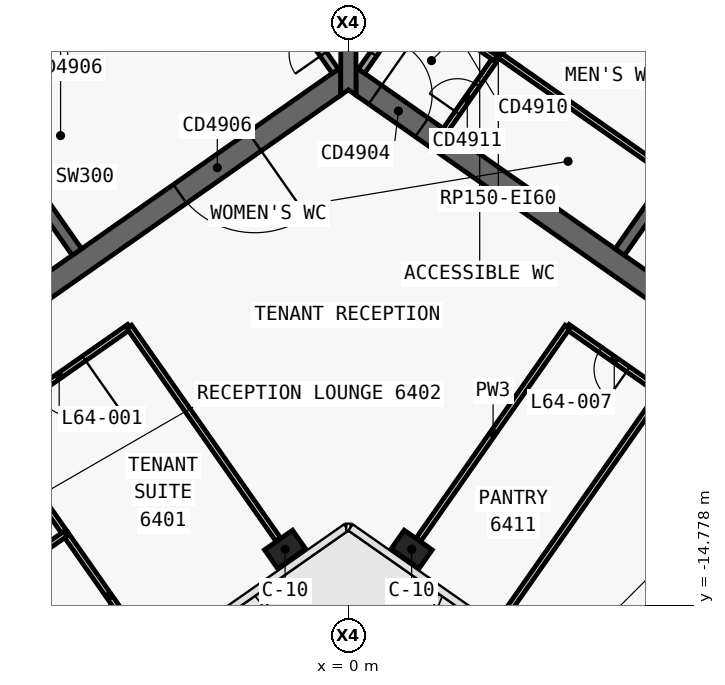
"""IFC4 building model, lengths in metres.
Left out: names, types, materials, properties, quantities, classifications, styles, units other than length and angle.
Written with IfcOpenShell. Run it as: python <this file> out.ifc"""

import sys

from ifc_helpers import new_model, si_unit, direction, frame, frame_2d, origin, origin_2d, place, context, subcontext, project, spatial, polyline, rectangle, outline, extrude, element, fill, save


model = new_model("IFC4")
c1 = context("Model", 3, precision=1e-05, world=origin(), true_north=direction((0.0, 1.0)))
c2 = subcontext(c1, "Body", "Model", "MODEL_VIEW")
j1 = project(units=[si_unit("LENGTHUNIT", "METRE"), si_unit("PLANEANGLEUNIT", "RADIAN")], contexts=[c1])
p1 = place(None, origin())
s1 = spatial("IfcSite", under=j1, at=p1, CompositionType="ELEMENT")
p2 = place(p1, origin())
s2 = spatial("IfcBuilding", under=s1, at=p2, CompositionType="ELEMENT")
p3 = place(p2, frame((0.0, 0.0, 272.2)))
s3 = spatial("IfcBuildingStorey", under=s2, at=p3, CompositionType="ELEMENT", Elevation=272.2)
p4 = place(p3, frame((-0.028, 12.066, 0.0), z_axis=(0.0, 0.0, 1.0), x_axis=(-0.819151382952, -0.573577380837, 0.0)))
e1 = element("IfcWall", 1, at=p4, inside=s3, PredefinedType="SHEAR", context=c2, shape_type="SweptSolid", body=[
    extrude(outline(polyline([(33.898, 0.3), (0.42, 0.3), (0.0, -0.3), (33.898, -0.3), (33.898, 0.3)])), origin(), (0.0, 0.0, 1.0), 3.9),
])
p5 = place(p3, frame((-0.028, -0.874, 0.0), z_axis=(0.0, 0.0, 1.0), x_axis=(-0.819150035022, -0.573579305871, 0.0)))
e2 = element("IfcWall", 2, at=p5, inside=s3, PredefinedType="SHEAR", context=c2, shape_type="SweptSolid", body=[
    extrude(outline(polyline([(26.476, 0.3), (0.42, 0.3), (0.0, -0.3), (26.476, -0.3), (26.476, 0.3)])), origin(), (0.0, 0.0, 1.0), 3.9),
])
p6 = place(p5, frame((2.976, 0.0, 0.0)))
e3 = element("IfcOpeningElement", 3, at=p6, cuts=e2, PredefinedType="OPENING", context=c2, shape_type="SweptSolid", body=[
    extrude(rectangle(XDim=2.4, YDim=2.1, at=frame_2d((1.2, 1.05))), frame((0.0, 0.31, 0.0), z_axis=(0.0, -1.0, 0.0), x_axis=(1.0, 0.0, 0.0)), (0.0, 0.0, 1.0), 0.62),
])
p7 = place(p5, frame((11.776, 0.0, 0.0)))
e4 = element("IfcOpeningElement", 4, at=p7, cuts=e2, PredefinedType="OPENING", context=c2, shape_type="SweptSolid", body=[
    extrude(rectangle(XDim=2.4, YDim=2.1, at=frame_2d((1.2, 1.05))), frame((0.0, 0.31, 0.0), z_axis=(0.0, -1.0, 0.0), x_axis=(1.0, 0.0, 0.0)), (0.0, 0.0, 1.0), 0.62),
])
p8 = place(p3, frame((-7.143, -5.49, 0.0), z_axis=(0.0, 0.0, 1.0), x_axis=(-0.573617744349, 0.819123118565, 0.0)))
e5 = element("IfcWall", 5, at=p8, inside=s3, PredefinedType="SHEAR", context=c2, shape_type="SweptSolid", body=[
    extrude(outline(polyline([(4.85, 0.15), (0.0, 0.15), (0.0, -0.15), (4.85, -0.15), (4.85, 0.15)])), origin(), (0.0, 0.0, 1.0), 3.9),
])
p9 = place(p3, frame((-2.638, 3.768, 0.0), z_axis=(0.0, 0.0, 1.0), x_axis=(-0.819155014212, -0.573572194837, 0.0)))
e6 = element("IfcWall", 6, at=p9, inside=s3, PredefinedType="SHEAR", context=c2, shape_type="SweptSolid", body=[
    extrude(outline(polyline([(26.4, 0.15), (0.0, 0.15), (0.0, -0.15), (26.4, -0.15), (26.4, 0.15)])), origin(), (0.0, 0.0, 1.0), 3.9),
])
p10 = place(p9, frame((1.169, 0.0, 0.0)))
e7 = element("IfcOpeningElement", 7, at=p10, cuts=e6, PredefinedType="OPENING", context=c2, shape_type="SweptSolid", body=[
    extrude(rectangle(XDim=1.1, YDim=2.1, at=frame_2d((0.55, 1.05))), frame((0.0, 0.16, 0.0), z_axis=(0.0, -1.0, 0.0), x_axis=(1.0, 0.0, 0.0)), (0.0, 0.0, 1.0), 0.32),
])
p11 = place(p9, frame((3.206, 0.0, 0.0)))
e8 = element("IfcOpeningElement", 8, at=p11, cuts=e6, PredefinedType="OPENING", context=c2, shape_type="SweptSolid", body=[
    extrude(rectangle(XDim=1.1, YDim=2.1, at=frame_2d((0.55, 1.05))), frame((0.0, 0.16, 0.0), z_axis=(0.0, -1.0, 0.0), x_axis=(1.0, 0.0, 0.0)), (0.0, 0.0, 1.0), 0.32),
])
p12 = place(p9, frame((5.244, 0.0, 0.0)))
e9 = element("IfcOpeningElement", 9, at=p12, cuts=e6, PredefinedType="OPENING", context=c2, shape_type="SweptSolid", body=[
    extrude(rectangle(XDim=1.1, YDim=2.1, at=frame_2d((0.55, 1.05))), frame((0.0, 0.16, 0.0), z_axis=(0.0, -1.0, 0.0), x_axis=(1.0, 0.0, 0.0)), (0.0, 0.0, 1.0), 0.32),
])
p13 = place(p9, frame((7.281, 0.0, 0.0)))
e10 = element("IfcOpeningElement", 10, at=p13, cuts=e6, PredefinedType="OPENING", context=c2, shape_type="SweptSolid", body=[
    extrude(rectangle(XDim=1.1, YDim=2.1, at=frame_2d((0.55, 1.05))), frame((0.0, 0.16, 0.0), z_axis=(0.0, -1.0, 0.0), x_axis=(1.0, 0.0, 0.0)), (0.0, 0.0, 1.0), 0.32),
])
p14 = place(p9, frame((9.688, 0.0, 0.0)))
e11 = element("IfcOpeningElement", 11, at=p14, cuts=e6, PredefinedType="OPENING", context=c2, shape_type="SweptSolid", body=[
    extrude(rectangle(XDim=1.1, YDim=2.1, at=frame_2d((0.55, 1.05))), frame((0.0, 0.16, 0.0), z_axis=(0.0, -1.0, 0.0), x_axis=(1.0, 0.0, 0.0)), (0.0, 0.0, 1.0), 0.32),
])
p15 = place(p9, frame((11.863, 0.0, 0.0)))
e12 = element("IfcOpeningElement", 12, at=p15, cuts=e6, PredefinedType="OPENING", context=c2, shape_type="SweptSolid", body=[
    extrude(rectangle(XDim=1.1, YDim=2.1, at=frame_2d((0.55, 1.05))), frame((0.0, 0.16, 0.0), z_axis=(0.0, -1.0, 0.0), x_axis=(1.0, 0.0, 0.0)), (0.0, 0.0, 1.0), 0.32),
])
p16 = place(p9, frame((15.175, 0.0, 0.0)))
e13 = element("IfcOpeningElement", 13, at=p16, cuts=e6, PredefinedType="OPENING", context=c2, shape_type="SweptSolid", body=[
    extrude(rectangle(XDim=1.0, YDim=2.1, at=frame_2d((0.5, 1.05))), frame((0.0, 0.16, 0.0), z_axis=(0.0, -1.0, 0.0), x_axis=(1.0, 0.0, 0.0)), (0.0, 0.0, 1.0), 0.32),
])
p17 = place(p3, frame((0.028, 12.066, 0.0), z_axis=(0.0, 0.0, 1.0), x_axis=(0.819151382952, -0.573577380837, 0.0)))
e14 = element("IfcWall", 14, at=p17, inside=s3, PredefinedType="SHEAR", context=c2, shape_type="SweptSolid", body=[
    extrude(outline(polyline([(33.898, 0.3), (0.0, 0.3), (0.42, -0.3), (33.898, -0.3), (33.898, 0.3)])), origin(), (0.0, 0.0, 1.0), 3.9),
])
p18 = place(p3, frame((0.028, -0.874, 0.0), z_axis=(0.0, 0.0, 1.0), x_axis=(0.819150035022, -0.573579305871, 0.0)))
e15 = element("IfcWall", 15, at=p18, inside=s3, PredefinedType="SHEAR", context=c2, shape_type="SweptSolid", body=[
    extrude(outline(polyline([(26.476, 0.3), (0.0, 0.3), (0.42, -0.3), (26.476, -0.3), (26.476, 0.3)])), origin(), (0.0, 0.0, 1.0), 3.9),
])
p19 = place(p18, frame((0.826, 0.0, 0.0)))
e16 = element("IfcOpeningElement", 16, at=p19, cuts=e15, PredefinedType="OPENING", context=c2, shape_type="SweptSolid", body=[
    extrude(rectangle(XDim=1.5, YDim=2.1, at=frame_2d((0.75, 1.05))), frame((0.0, 0.31, 0.0), z_axis=(0.0, -1.0, 0.0), x_axis=(1.0, 0.0, 0.0)), (0.0, 0.0, 1.0), 0.62),
])
p20 = place(p18, frame((12.226, 0.0, 0.0)))
e17 = element("IfcOpeningElement", 17, at=p20, cuts=e15, PredefinedType="OPENING", context=c2, shape_type="SweptSolid", body=[
    extrude(rectangle(XDim=1.5, YDim=2.1, at=frame_2d((0.75, 1.05))), frame((0.0, 0.31, 0.0), z_axis=(0.0, -1.0, 0.0), x_axis=(1.0, 0.0, 0.0)), (0.0, 0.0, 1.0), 0.62),
])
p21 = place(p3, frame((7.143, -5.49, 0.0), z_axis=(0.0, 0.0, 1.0), x_axis=(0.573617744349, 0.819123118565, 0.0)))
e18 = element("IfcWall", 18, at=p21, inside=s3, PredefinedType="SHEAR", context=c2, shape_type="SweptSolid", body=[
    extrude(outline(polyline([(0.0, 0.15), (0.0, -0.15), (4.85, -0.15), (4.85, 0.15), (0.0, 0.15)])), origin(), (0.0, 0.0, 1.0), 3.9),
])
p22 = place(p3, frame((2.638, 3.768, 0.0), z_axis=(0.0, 0.0, 1.0), x_axis=(0.819155014212, -0.573572194837, 0.0)))
e19 = element("IfcWall", 19, at=p22, inside=s3, PredefinedType="SHEAR", context=c2, shape_type="SweptSolid", body=[
    extrude(outline(polyline([(0.0, 0.15), (0.0, -0.15), (26.4, -0.15), (26.4, 0.15), (0.0, 0.15)])), origin(), (0.0, 0.0, 1.0), 3.9),
])
p23 = place(p22, frame((9.637, 0.0, 0.0)))
e20 = element("IfcOpeningElement", 20, at=p23, cuts=e19, PredefinedType="OPENING", context=c2, shape_type="SweptSolid", body=[
    extrude(rectangle(XDim=1.2, YDim=2.1, at=frame_2d((0.6, 1.05))), frame((0.0, 0.16, 0.0), z_axis=(0.0, -1.0, 0.0), x_axis=(1.0, 0.0, 0.0)), (0.0, 0.0, 1.0), 0.32),
])
p24 = place(p22, frame((11.812, 0.0, 0.0)))
e21 = element("IfcOpeningElement", 21, at=p24, cuts=e19, PredefinedType="OPENING", context=c2, shape_type="SweptSolid", body=[
    extrude(rectangle(XDim=1.2, YDim=2.1, at=frame_2d((0.6, 1.05))), frame((0.0, 0.16, 0.0), z_axis=(0.0, -1.0, 0.0), x_axis=(1.0, 0.0, 0.0)), (0.0, 0.0, 1.0), 0.32),
])
p25 = place(p22, frame((13.988, 0.0, 0.0)))
e22 = element("IfcOpeningElement", 22, at=p25, cuts=e19, PredefinedType="OPENING", context=c2, shape_type="SweptSolid", body=[
    extrude(rectangle(XDim=1.2, YDim=2.1, at=frame_2d((0.6, 1.05))), frame((0.0, 0.16, 0.0), z_axis=(0.0, -1.0, 0.0), x_axis=(1.0, 0.0, 0.0)), (0.0, 0.0, 1.0), 0.32),
])
p26 = place(p22, frame((16.262, 0.0, 0.0)))
e23 = element("IfcOpeningElement", 23, at=p26, cuts=e19, PredefinedType="OPENING", context=c2, shape_type="SweptSolid", body=[
    extrude(rectangle(XDim=1.0, YDim=2.1, at=frame_2d((0.5, 1.05))), frame((0.0, 0.16, 0.0), z_axis=(0.0, -1.0, 0.0), x_axis=(1.0, 0.0, 0.0)), (0.0, 0.0, 1.0), 0.32),
])
p27 = place(p3, frame((0.0, -1.361, 0.0), z_axis=(0.0, 0.0, 1.0), x_axis=(0.0, 1.0, 0.0)))
e24 = element("IfcWall", 24, at=p27, inside=s3, PredefinedType="SHEAR", context=c2, shape_type="SweptSolid", body=[
    extrude(outline(polyline([(0.14, 0.2), (0.0, 0.2), (0.14, 0.0), (0.0, -0.2), (0.14, -0.2), (1.012, -0.2), (12.94, -0.2), (13.813, -0.2), (13.893, -0.2), (13.933, -0.172), (13.813, 0.0), (13.933, 0.172), (13.893, 0.2), (13.813, 0.2), (12.94, 0.2), (1.012, 0.2), (0.14, 0.2)])), origin(), (0.0, 0.0, 1.0), 3.9),
])
for number, where, z_axis, x_axis in (
    (25, (-1.665, -13.313, 0.0), (0.0, 0.0, 1.0), (-0.819, -0.574, 0.0)),
    (26, (1.665, -13.313, 0.0), (0.0, 0.0, 1.0), (0.819, -0.574, 0.0)),
):
    element("IfcColumn", number, at=place(p3, frame(where, z_axis=z_axis, x_axis=x_axis)), inside=s3, PredefinedType="COLUMN", context=c2, shape_type="SweptSolid", body=[
        extrude(rectangle(XDim=0.9, YDim=0.6, at=origin_2d()), origin(), (0.0, 0.0, 1.0), 3.9),
    ])
p28 = place(p3, frame((2.556, -2.278, 0.0), z_axis=(0.0, 0.0, 1.0), x_axis=(0.573560315113, 0.819163332265, 0.0)))
e27 = element("IfcWall", 27, at=p28, inside=s3, PredefinedType="PARTITIONING", context=c2, shape_type="SweptSolid", body=[
    extrude(rectangle(XDim=4.85, YDim=0.15, at=frame_2d((2.425, 0.0))), origin(), (0.0, 0.0, 1.0), 3.62),
])
p29 = place(p28, frame((0.55, 0.0, 0.0)))
e28 = element("IfcOpeningElement", 28, at=p29, cuts=e27, PredefinedType="OPENING", context=c2, shape_type="SweptSolid", body=[
    extrude(rectangle(XDim=0.9, YDim=2.1, at=frame_2d((0.45, 1.05))), frame((0.0, 0.085, 0.0), z_axis=(0.0, -1.0, 0.0), x_axis=(1.0, 0.0, 0.0)), (0.0, 0.0, 1.0), 0.17),
])
p30 = place(p28, frame((3.075, 0.0, 0.0)))
e29 = element("IfcOpeningElement", 29, at=p30, cuts=e27, PredefinedType="OPENING", context=c2, shape_type="SweptSolid", body=[
    extrude(rectangle(XDim=0.9, YDim=2.1, at=frame_2d((0.45, 1.05))), frame((0.0, 0.085, 0.0), z_axis=(0.0, -1.0, 0.0), x_axis=(1.0, 0.0, 0.0)), (0.0, 0.0, 1.0), 0.17),
])
p31 = place(p3, frame((1.745, 1.097, 0.0), z_axis=(0.0, 0.0, 1.0), x_axis=(0.819178980414, -0.573537965655, 0.0)))
e30 = element("IfcWall", 30, at=p31, inside=s3, PredefinedType="PARTITIONING", context=c2, shape_type="SweptSolid", body=[
    extrude(rectangle(XDim=2.6, YDim=0.15, at=frame_2d((1.3, 0.0))), origin(), (0.0, 0.0, 1.0), 3.62),
])
p32 = place(p31, frame((0.85, 0.0, 0.0)))
e31 = element("IfcOpeningElement", 31, at=p32, cuts=e30, PredefinedType="OPENING", context=c2, shape_type="SweptSolid", body=[
    extrude(rectangle(XDim=0.9, YDim=2.1, at=frame_2d((0.45, 1.05))), frame((0.0, 0.085, 0.0), z_axis=(0.0, -1.0, 0.0), x_axis=(1.0, 0.0, 0.0)), (0.0, 0.0, 1.0), 0.17),
])
p33 = place(p3, frame((3.947, -0.292, 0.0), z_axis=(0.0, 0.0, 1.0), x_axis=(0.819151939971, -0.573576585332, 0.0)))
e32 = element("IfcWall", 32, at=p33, inside=s3, PredefinedType="PARTITIONING", context=c2, shape_type="SweptSolid", body=[
    extrude(rectangle(XDim=5.45, YDim=0.15, at=frame_2d((2.725, 0.0))), origin(), (0.0, 0.0, 1.0), 3.62),
])
p34 = place(p3, frame((-0.344, -0.729, 0.0), z_axis=(0.0, 0.0, 1.0), x_axis=(-0.573560315113, 0.819163332265, 0.0)))
e33 = element("IfcWall", 33, at=p34, inside=s3, PredefinedType="SOLIDWALL", context=c2, shape_type="SweptSolid", body=[
    extrude(rectangle(XDim=4.85, YDim=0.2, at=frame_2d((2.425, 0.0))), origin(), (0.0, 0.0, 1.0), 3.62),
])
p35 = place(p34, frame((0.55, 0.0, 0.0)))
e34 = element("IfcOpeningElement", 34, at=p35, cuts=e33, PredefinedType="OPENING", context=c2, shape_type="SweptSolid", body=[
    extrude(rectangle(XDim=0.9, YDim=2.1, at=frame_2d((0.45, 1.05))), frame((0.0, 0.11, 0.0), z_axis=(0.0, -1.0, 0.0), x_axis=(1.0, 0.0, 0.0)), (0.0, 0.0, 1.0), 0.22),
])
p36 = place(p3, frame((0.344, -0.729, 0.0), z_axis=(0.0, 0.0, 1.0), x_axis=(0.573560315113, 0.819163332265, 0.0)))
e35 = element("IfcWall", 35, at=p36, inside=s3, PredefinedType="SOLIDWALL", context=c2, shape_type="SweptSolid", body=[
    extrude(rectangle(XDim=4.85, YDim=0.2, at=frame_2d((2.425, 0.0))), origin(), (0.0, 0.0, 1.0), 3.62),
])
p37 = place(p36, frame((0.55, 0.0, 0.0)))
e36 = element("IfcOpeningElement", 36, at=p37, cuts=e35, PredefinedType="OPENING", context=c2, shape_type="SweptSolid", body=[
    extrude(rectangle(XDim=0.9, YDim=2.1, at=frame_2d((0.45, 1.05))), frame((0.0, 0.11, 0.0), z_axis=(0.0, -1.0, 0.0), x_axis=(1.0, 0.0, 0.0)), (0.0, 0.0, 1.0), 0.22),
])
p38 = place(p3, frame((8.225, -9.178, 0.0), z_axis=(0.0, 0.0, 1.0), x_axis=(-0.819132568355, 0.573604249862, 0.0)))
e37 = element("IfcWall", 37, at=p38, inside=s3, PredefinedType="PARTITIONING", context=c2, shape_type="SweptSolid", body=[
    extrude(rectangle(XDim=3.002, YDim=0.15, at=frame_2d((1.501, 0.0))), origin(), (0.0, 0.0, 1.0), 3.05),
])
p39 = place(p38, frame((1.051, 0.0, 0.0)))
e38 = element("IfcOpeningElement", 38, at=p39, cuts=e37, PredefinedType="OPENING", context=c2, shape_type="SweptSolid", body=[
    extrude(rectangle(XDim=0.9, YDim=2.1, at=frame_2d((0.45, 1.05))), frame((0.0, 0.085, 0.0), z_axis=(0.0, -1.0, 0.0), x_axis=(1.0, 0.0, 0.0)), (0.0, 0.0, 1.0), 0.17),
])
p40 = place(p3, frame((-5.766, -7.456, 0.0), z_axis=(0.0, 0.0, 1.0), x_axis=(-0.819142740634, -0.573589723117, 0.0)))
e39 = element("IfcWall", 39, at=p40, inside=s3, PredefinedType="PARTITIONING", context=c2, shape_type="SweptSolid", body=[
    extrude(rectangle(XDim=4.502, YDim=0.15, at=frame_2d((2.251, 0.0))), origin(), (0.0, 0.0, 1.0), 3.05),
])
p41 = place(p40, frame((1.451, 0.0, 0.0)))
e40 = element("IfcOpeningElement", 40, at=p41, cuts=e39, PredefinedType="OPENING", context=c2, shape_type="SweptSolid", body=[
    extrude(rectangle(XDim=1.6, YDim=2.1, at=frame_2d((0.8, 1.05))), frame((0.0, 0.085, 0.0), z_axis=(0.0, -1.0, 0.0), x_axis=(1.0, 0.0, 0.0)), (0.0, 0.0, 1.0), 0.17),
])
p42 = place(p3, frame((8.224, -9.177, 0.0), z_axis=(0.0, 0.0, 1.0), x_axis=(-0.573560650686, -0.819163097304, 0.0)))
e41 = element("IfcWall", 41, at=p42, inside=s3, PredefinedType="PARTITIONING", context=c2, shape_type="SweptSolid", body=[
    extrude(rectangle(XDim=7.5, YDim=0.15, at=frame_2d((3.75, 0.0))), origin(), (0.0, 0.0, 1.0), 3.0),
])
p43 = place(p3, frame((1.849, -13.051, 0.0), z_axis=(0.0, 0.0, 1.0), x_axis=(0.573577493031, 0.819151304393, 0.0)))
e42 = element("IfcWall", 42, at=p43, inside=s3, PredefinedType="PARTITIONING", context=c2, shape_type="SweptSolid", body=[
    extrude(rectangle(XDim=6.83, YDim=0.15, at=frame_2d((3.415, 0.0))), origin(), (0.0, 0.0, 1.0), 3.05),
])
p44 = place(p3, frame((-1.849, -13.051, 0.0), z_axis=(0.0, 0.0, 1.0), x_axis=(-0.57357985571, 0.819149650018, 0.0)))
e43 = element("IfcWall", 43, at=p44, inside=s3, PredefinedType="PARTITIONING", context=c2, shape_type="SweptSolid", body=[
    extrude(rectangle(XDim=6.832, YDim=0.15, at=frame_2d((3.416, 0.0))), origin(), (0.0, 0.0, 1.0), 3.05),
])
p45 = place(p3, frame((-7.444, -12.906, 0.0), z_axis=(0.0, 0.0, 1.0), x_axis=(-0.573555919535, 0.819166409935, 0.0)))
e44 = element("IfcWall", 44, at=p45, inside=s3, PredefinedType="PARTITIONING", context=c2, shape_type="SweptSolid", body=[
    extrude(rectangle(XDim=3.502, YDim=0.15, at=frame_2d((1.751, 0.0))), origin(), (0.0, 0.0, 1.0), 3.62),
])
p46 = place(p3, frame((-5.151, -16.18, 0.0), z_axis=(0.0, 0.0, 1.0), x_axis=(-0.573593387921, 0.81914017441, 0.0)))
e45 = element("IfcWall", 45, at=p46, inside=s3, PredefinedType="PARTITIONING", context=c2, shape_type="SweptSolid", body=[
    extrude(rectangle(XDim=4.001, YDim=0.15, at=frame_2d((2.0, 0.0))), origin(), (0.0, 0.0, 1.0), 3.0),
])
p47 = place(p3, frame((-7.445, -12.904, 0.0), z_axis=(0.0, 0.0, 1.0), x_axis=(-0.819137093595, -0.573597787563, 0.0)))
e46 = element("IfcWall", 46, at=p47, inside=s3, PredefinedType="PARTITIONING", context=c2, shape_type="SweptSolid", body=[
    extrude(rectangle(XDim=7.5, YDim=0.15, at=frame_2d((3.75, 0.0))), origin(), (0.0, 0.0, 1.0), 3.05),
])
p48 = place(p6, origin())
e47 = element("IfcDoor", 47, at=p48, inside=s3, OperationType="DOUBLE_DOOR_SINGLE_SWING", PredefinedType="DOOR", context=c2, shape_type="SweptSolid", body=[
    extrude(rectangle(XDim=2.4, YDim=2.1, at=frame_2d((1.2, 1.05))), frame((0.0, 0.025, 0.0), z_axis=(0.0, -1.0, 0.0), x_axis=(1.0, 0.0, 0.0)), (0.0, 0.0, 1.0), 0.05),
])
fill(e3, e47)
p49 = place(p29, origin())
e48 = element("IfcDoor", 48, at=p49, inside=s3, OperationType="SINGLE_SWING_RIGHT", PredefinedType="DOOR", context=c2, shape_type="SweptSolid", body=[
    extrude(rectangle(XDim=0.9, YDim=2.1, at=frame_2d((0.45, 1.05))), frame((0.0, 0.025, 0.0), z_axis=(0.0, -1.0, 0.0), x_axis=(1.0, 0.0, 0.0)), (0.0, 0.0, 1.0), 0.05),
])
fill(e28, e48)
p50 = place(p19, origin())
e49 = element("IfcDoor", 49, at=p50, inside=s3, OperationType="SINGLE_SWING_RIGHT", PredefinedType="DOOR", context=c2, shape_type="SweptSolid", body=[
    extrude(rectangle(XDim=1.5, YDim=2.1, at=frame_2d((0.75, 1.05))), frame((0.0, 0.025, 0.0), z_axis=(0.0, -1.0, 0.0), x_axis=(1.0, 0.0, 0.0)), (0.0, 0.0, 1.0), 0.05),
])
fill(e16, e49)
p51 = place(p35, origin())
e50 = element("IfcDoor", 50, at=p51, inside=s3, OperationType="SINGLE_SWING_RIGHT", PredefinedType="DOOR", context=c2, shape_type="SweptSolid", body=[
    extrude(rectangle(XDim=0.9, YDim=2.1, at=frame_2d((0.45, 1.05))), frame((0.0, 0.025, 0.0), z_axis=(0.0, -1.0, 0.0), x_axis=(1.0, 0.0, 0.0)), (0.0, 0.0, 1.0), 0.05),
])
fill(e34, e50)
p52 = place(p37, origin())
e51 = element("IfcDoor", 51, at=p52, inside=s3, OperationType="SINGLE_SWING_RIGHT", PredefinedType="DOOR", context=c2, shape_type="SweptSolid", body=[
    extrude(rectangle(XDim=0.9, YDim=2.1, at=frame_2d((0.45, 1.05))), frame((0.0, 0.025, 0.0), z_axis=(0.0, -1.0, 0.0), x_axis=(1.0, 0.0, 0.0)), (0.0, 0.0, 1.0), 0.05),
])
fill(e36, e51)
p53 = place(p41, origin())
e52 = element("IfcDoor", 52, at=p53, inside=s3, OperationType="DOUBLE_DOOR_SINGLE_SWING", PredefinedType="DOOR", context=c2, shape_type="SweptSolid", body=[
    extrude(rectangle(XDim=1.6, YDim=2.1, at=frame_2d((0.8, 1.05))), frame((0.0, 0.025, 0.0), z_axis=(0.0, -1.0, 0.0), x_axis=(1.0, 0.0, 0.0)), (0.0, 0.0, 1.0), 0.05),
])
fill(e40, e52)
p54 = place(p39, origin())
e53 = element("IfcDoor", 53, at=p54, inside=s3, OperationType="SINGLE_SWING_RIGHT", PredefinedType="DOOR", context=c2, shape_type="SweptSolid", body=[
    extrude(rectangle(XDim=0.9, YDim=2.1, at=frame_2d((0.45, 1.05))), frame((0.0, 0.025, 0.0), z_axis=(0.0, -1.0, 0.0), x_axis=(1.0, 0.0, 0.0)), (0.0, 0.0, 1.0), 0.05),
])
fill(e38, e53)
save(model, sys.argv[1])
